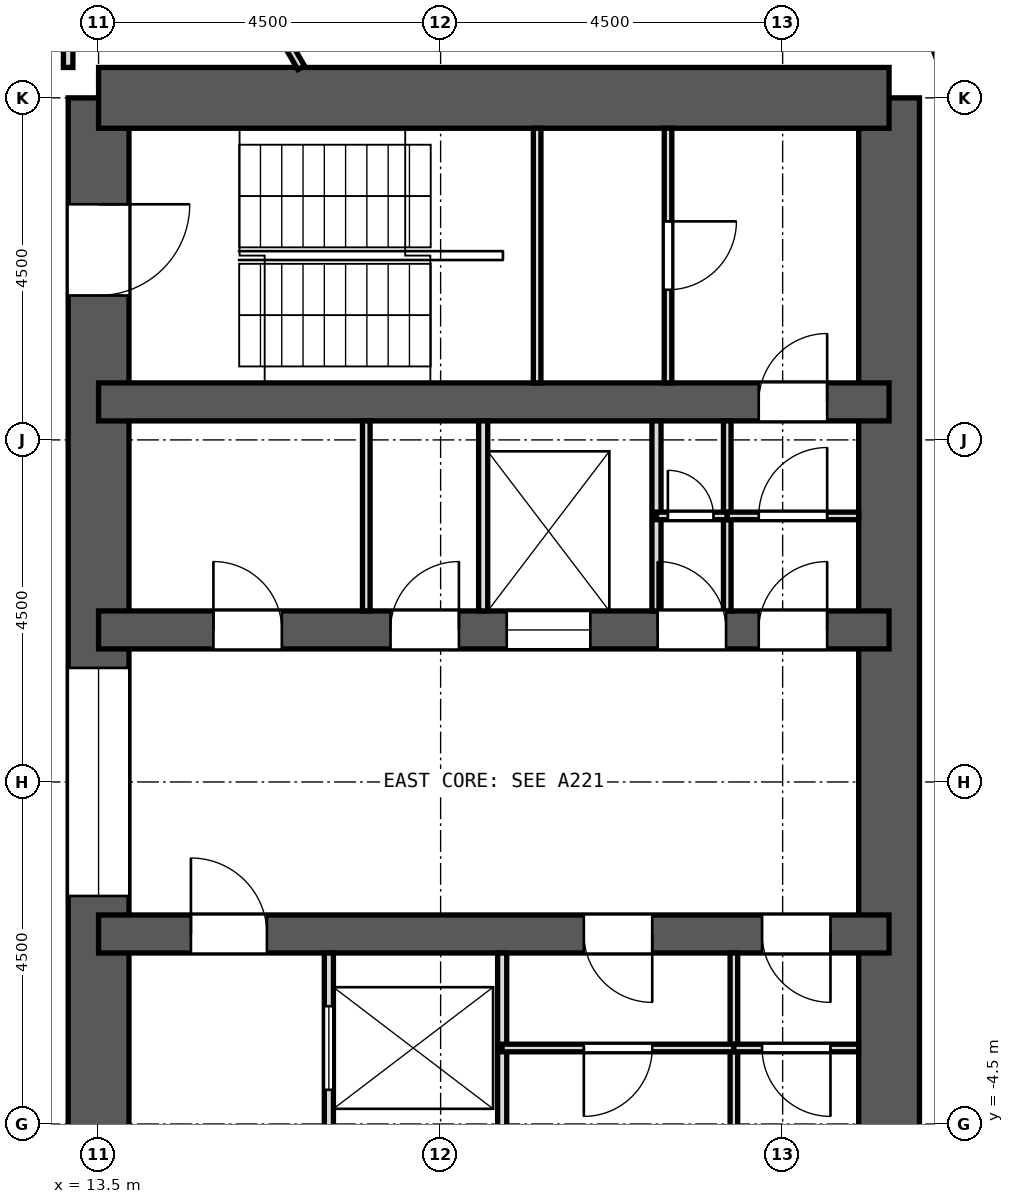
"""IFC4 building model, lengths in metres.
Left out: names, types, materials, properties, quantities, classifications, styles, units other than length and angle.
Written with IfcOpenShell. Run it as: python <this file> out.ifc"""

import sys

from ifc_helpers import new_model, si_unit, direction, frame, frame_2d, origin, place, context, subcontext, project, spatial, rectangle, extrude, element, fill, save


model = new_model("IFC4")
c1 = context("Model", 3, precision=1e-05, world=origin(), true_north=direction((0.0, 1.0)))
c2 = subcontext(c1, "Body", "Model", "MODEL_VIEW")
j1 = project(units=[si_unit("LENGTHUNIT", "METRE"), si_unit("PLANEANGLEUNIT", "RADIAN")], contexts=[c1])
p1 = place(None, origin())
s1 = spatial("IfcSite", under=j1, at=p1, CompositionType="ELEMENT")
p2 = place(p1, origin())
s2 = spatial("IfcBuilding", under=s1, at=p2, CompositionType="ELEMENT")
p3 = place(p2, frame((0.0, 0.0, 131.5)))
s3 = spatial("IfcBuildingStorey", under=s2, at=p3, CompositionType="ELEMENT", Elevation=131.5)
p4 = place(p3, frame((13.5, -9.0, 0.0), z_axis=(0.0, 0.0, 1.0), x_axis=(0.0, 1.0, 0.0)))
e1 = element("IfcWall", 1, at=p4, inside=s3, PredefinedType="SHEAR", context=c2, shape_type="SweptSolid", body=[
    extrude(rectangle(XDim=18.0, YDim=0.8, at=frame_2d((9.0, 0.0))), origin(), (0.0, 0.0, 1.0), 3.3),
])
p5 = place(p4, frame((15.4, 0.0, 0.0)))
e2 = element("IfcOpeningElement", 2, at=p5, cuts=e1, PredefinedType="OPENING", context=c2, shape_type="SweptSolid", body=[
    extrude(rectangle(XDim=1.2, YDim=2.1, at=frame_2d((0.6, 1.05))), frame((0.0, 0.412, 0.0), z_axis=(0.0, -1.0, 0.0), x_axis=(1.0, 0.0, 0.0)), (0.0, 0.0, 1.0), 0.824),
])
p6 = place(p4, frame((1.4, 0.0, 0.0)))
e3 = element("IfcOpeningElement", 3, at=p6, cuts=e1, PredefinedType="OPENING", context=c2, shape_type="SweptSolid", body=[
    extrude(rectangle(XDim=1.2, YDim=2.1, at=frame_2d((0.6, 1.05))), frame((0.0, 0.412, 0.0), z_axis=(0.0, -1.0, 0.0), x_axis=(1.0, 0.0, 0.0)), (0.0, 0.0, 1.0), 0.824),
])
p7 = place(p4, frame((7.5, 0.0, 0.0)))
e4 = element("IfcOpeningElement", 4, at=p7, cuts=e1, PredefinedType="OPENING", context=c2, shape_type="SweptSolid", body=[
    extrude(rectangle(XDim=3.0, YDim=2.4, at=frame_2d((1.5, 1.2))), frame((0.0, 0.412, 0.0), z_axis=(0.0, -1.0, 0.0), x_axis=(1.0, 0.0, 0.0)), (0.0, 0.0, 1.0), 0.824),
])
p8 = place(p3, frame((23.9, -9.0, 0.0), z_axis=(0.0, 0.0, 1.0), x_axis=(0.0, 1.0, 0.0)))
e5 = element("IfcWall", 5, at=p8, inside=s3, PredefinedType="SHEAR", context=c2, shape_type="SweptSolid", body=[
    extrude(rectangle(XDim=18.0, YDim=0.8, at=frame_2d((9.0, 0.0))), origin(), (0.0, 0.0, 1.0), 3.3),
])
p9 = place(p3, frame((13.5, 9.0, 0.0), z_axis=(0.0, 0.0, 1.0), x_axis=(1.0, 0.0, 0.0)))
e6 = element("IfcWall", 6, at=p9, inside=s3, PredefinedType="SHEAR", context=c2, shape_type="SweptSolid", body=[
    extrude(rectangle(XDim=10.4, YDim=0.8, at=frame_2d((5.2, 0.0))), origin(), (0.0, 0.0, 1.0), 3.3),
])
p10 = place(p3, frame((13.5, 5.0, 0.0), z_axis=(0.0, 0.0, 1.0), x_axis=(1.0, 0.0, 0.0)))
e7 = element("IfcWall", 7, at=p10, inside=s3, PredefinedType="SHEAR", context=c2, shape_type="SweptSolid", body=[
    extrude(rectangle(XDim=10.4, YDim=0.5, at=frame_2d((5.2, 0.0))), origin(), (0.0, 0.0, 1.0), 3.3),
])
p11 = place(p10, frame((8.686, 0.0, 0.0)))
e8 = element("IfcOpeningElement", 8, at=p11, cuts=e7, PredefinedType="OPENING", context=c2, shape_type="SweptSolid", body=[
    extrude(rectangle(XDim=0.9, YDim=2.1, at=frame_2d((0.45, 1.05))), frame((0.0, 0.262, 0.0), z_axis=(0.0, -1.0, 0.0), x_axis=(1.0, 0.0, 0.0)), (0.0, 0.0, 1.0), 0.524),
])
p12 = place(p3, frame((13.5, 2.0, 0.0), z_axis=(0.0, 0.0, 1.0), x_axis=(1.0, 0.0, 0.0)))
e9 = element("IfcWall", 9, at=p12, inside=s3, PredefinedType="SHEAR", context=c2, shape_type="SweptSolid", body=[
    extrude(rectangle(XDim=10.4, YDim=0.5, at=frame_2d((5.2, 0.0))), origin(), (0.0, 0.0, 1.0), 3.3),
])
p13 = place(p12, frame((5.37, 0.0, 0.0)))
e10 = element("IfcOpeningElement", 10, at=p13, cuts=e9, PredefinedType="OPENING", context=c2, shape_type="SweptSolid", body=[
    extrude(rectangle(XDim=1.1, YDim=2.1, at=frame_2d((0.55, 1.05))), frame((0.0, 0.262, 0.0), z_axis=(0.0, -1.0, 0.0), x_axis=(1.0, 0.0, 0.0)), (0.0, 0.0, 1.0), 0.524),
])
p14 = place(p12, frame((1.511, 0.0, 0.0)))
e11 = element("IfcOpeningElement", 11, at=p14, cuts=e9, PredefinedType="OPENING", context=c2, shape_type="SweptSolid", body=[
    extrude(rectangle(XDim=0.9, YDim=2.1, at=frame_2d((0.45, 1.05))), frame((0.0, 0.262, 0.0), z_axis=(0.0, -1.0, 0.0), x_axis=(1.0, 0.0, 0.0)), (0.0, 0.0, 1.0), 0.524),
])
p15 = place(p12, frame((3.841, 0.0, 0.0)))
e12 = element("IfcOpeningElement", 12, at=p15, cuts=e9, PredefinedType="OPENING", context=c2, shape_type="SweptSolid", body=[
    extrude(rectangle(XDim=0.9, YDim=2.1, at=frame_2d((0.45, 1.05))), frame((0.0, 0.262, 0.0), z_axis=(0.0, -1.0, 0.0), x_axis=(1.0, 0.0, 0.0)), (0.0, 0.0, 1.0), 0.524),
])
p16 = place(p12, frame((7.355, 0.0, 0.0)))
e13 = element("IfcOpeningElement", 13, at=p16, cuts=e9, PredefinedType="OPENING", context=c2, shape_type="SweptSolid", body=[
    extrude(rectangle(XDim=0.9, YDim=2.1, at=frame_2d((0.45, 1.05))), frame((0.0, 0.262, 0.0), z_axis=(0.0, -1.0, 0.0), x_axis=(1.0, 0.0, 0.0)), (0.0, 0.0, 1.0), 0.524),
])
p17 = place(p12, frame((8.686, 0.0, 0.0)))
e14 = element("IfcOpeningElement", 14, at=p17, cuts=e9, PredefinedType="OPENING", context=c2, shape_type="SweptSolid", body=[
    extrude(rectangle(XDim=0.9, YDim=2.1, at=frame_2d((0.45, 1.05))), frame((0.0, 0.262, 0.0), z_axis=(0.0, -1.0, 0.0), x_axis=(1.0, 0.0, 0.0)), (0.0, 0.0, 1.0), 0.524),
])
p18 = place(p3, frame((13.5, -2.0, 0.0), z_axis=(0.0, 0.0, 1.0), x_axis=(1.0, 0.0, 0.0)))
e15 = element("IfcWall", 15, at=p18, inside=s3, PredefinedType="SHEAR", context=c2, shape_type="SweptSolid", body=[
    extrude(rectangle(XDim=10.4, YDim=0.5, at=frame_2d((5.2, 0.0))), origin(), (0.0, 0.0, 1.0), 3.3),
])
p19 = place(p18, frame((1.215, 0.0, 0.0)))
e16 = element("IfcOpeningElement", 16, at=p19, cuts=e15, PredefinedType="OPENING", context=c2, shape_type="SweptSolid", body=[
    extrude(rectangle(XDim=1.0, YDim=2.1, at=frame_2d((0.5, 1.05))), frame((0.0, 0.262, 0.0), z_axis=(0.0, -1.0, 0.0), x_axis=(1.0, 0.0, 0.0)), (0.0, 0.0, 1.0), 0.524),
])
p20 = place(p18, frame((6.384, 0.0, 0.0)))
e17 = element("IfcOpeningElement", 17, at=p20, cuts=e15, PredefinedType="OPENING", context=c2, shape_type="SweptSolid", body=[
    extrude(rectangle(XDim=0.9, YDim=2.1, at=frame_2d((0.45, 1.05))), frame((0.0, 0.262, 0.0), z_axis=(0.0, -1.0, 0.0), x_axis=(1.0, 0.0, 0.0)), (0.0, 0.0, 1.0), 0.524),
])
p21 = place(p18, frame((8.729, 0.0, 0.0)))
e18 = element("IfcOpeningElement", 18, at=p21, cuts=e15, PredefinedType="OPENING", context=c2, shape_type="SweptSolid", body=[
    extrude(rectangle(XDim=0.9, YDim=2.1, at=frame_2d((0.45, 1.05))), frame((0.0, 0.262, 0.0), z_axis=(0.0, -1.0, 0.0), x_axis=(1.0, 0.0, 0.0)), (0.0, 0.0, 1.0), 0.524),
])
p22 = place(p3, frame((25.617, 7.383, 0.0), z_axis=(0.0, 0.0, 1.0), x_axis=(-0.341990236633, 0.939703505393, 0.0)))
e19 = element("IfcWall", 19, at=p22, inside=s3, PredefinedType="SOLIDWALL", context=c2, shape_type="SweptSolid", body=[
    extrude(rectangle(XDim=3.648, YDim=0.6, at=frame_2d((1.824, 0.0))), origin(), (0.0, 0.0, 1.0), 2.8),
])
p23 = place(p3, frame((15.351, 10.81, 0.0), z_axis=(0.0, 0.0, 1.0), x_axis=(0.499618727529, -0.866245419672, 0.0)))
e20 = element("IfcWall", 20, at=p23, inside=s3, PredefinedType="PARTITIONING", context=c2, shape_type="SweptSolid", body=[
    extrude(rectangle(XDim=1.63, YDim=0.1, at=frame_2d((0.815, 0.0))), origin(), (0.0, 0.0, 1.0), 2.8),
])
p24 = place(p3, frame((7.852, 7.852, 0.0), z_axis=(0.0, 0.0, 1.0), x_axis=(0.707106781187, 0.707106781187, 0.0)))
e21 = element("IfcWall", 21, at=p24, inside=s3, PredefinedType="PARTITIONING", context=c2, shape_type="SweptSolid", body=[
    extrude(rectangle(XDim=7.615, YDim=0.125, at=frame_2d((3.807, 0.0))), origin(), (0.0, 0.0, 1.0), 2.8),
])
p25 = place(p3, frame((13.1, 9.4, 0.0), z_axis=(0.0, 0.0, 1.0), x_axis=(0.0, 1.0, 0.0)))
e22 = element("IfcWall", 22, at=p25, inside=s3, PredefinedType="PARTITIONING", context=c2, shape_type="SweptSolid", body=[
    extrude(rectangle(XDim=3.638, YDim=0.125, at=frame_2d((1.819, 0.0))), origin(), (0.0, 0.0, 1.0), 2.8),
])
p26 = place(p3, frame((17.022, 2.25, 0.0), z_axis=(0.0, 0.0, 1.0), x_axis=(0.0, 1.0, 0.0)))
e23 = element("IfcWall", 23, at=p26, inside=s3, PredefinedType="PARTITIONING", context=c2, shape_type="SweptSolid", body=[
    extrude(rectangle(XDim=2.5, YDim=0.1, at=frame_2d((1.25, 0.0))), origin(), (0.0, 0.0, 1.0), 2.8),
])
for number, where, z_axis, x_axis in (
    (24, (18.56, 2.25, 0.0), (0.0, 0.0, 1.0), (0.0, 1.0, 0.0)),
    (25, (20.84, 2.25, 0.0), (0.0, 0.0, 1.0), (0.0, 1.0, 0.0)),
):
    element("IfcWall", number, at=place(p3, frame(where, z_axis=z_axis, x_axis=x_axis)), inside=s3, PredefinedType="PARTITIONING", context=c2, shape_type="SweptSolid", body=[
        extrude(rectangle(XDim=2.5, YDim=0.12, at=frame_2d((1.25, 0.0))), origin(), (0.0, 0.0, 1.0), 2.8),
    ])
p27 = place(p3, frame((21.771, 2.25, 0.0), z_axis=(0.0, 0.0, 1.0), x_axis=(0.0, 1.0, 0.0)))
e26 = element("IfcWall", 26, at=p27, inside=s3, PredefinedType="PARTITIONING", context=c2, shape_type="SweptSolid", body=[
    extrude(rectangle(XDim=2.5, YDim=0.1, at=frame_2d((1.25, 0.0))), origin(), (0.0, 0.0, 1.0), 2.8),
])
p28 = place(p3, frame((16.53, -4.75, 0.0), z_axis=(0.0, 0.0, 1.0), x_axis=(0.0, 1.0, 0.0)))
e27 = element("IfcWall", 27, at=p28, inside=s3, PredefinedType="PARTITIONING", context=c2, shape_type="SweptSolid", body=[
    extrude(rectangle(XDim=2.5, YDim=0.12, at=frame_2d((1.25, 0.0))), origin(), (0.0, 0.0, 1.0), 2.8),
])
p29 = place(p28, frame((0.7, 0.0, 0.0)))
e28 = element("IfcOpeningElement", 28, at=p29, cuts=e27, PredefinedType="OPENING", context=c2, shape_type="SweptSolid", body=[
    extrude(rectangle(XDim=1.1, YDim=2.1, at=frame_2d((0.55, 1.05))), frame((0.0, 0.072, 0.0), z_axis=(0.0, -1.0, 0.0), x_axis=(1.0, 0.0, 0.0)), (0.0, 0.0, 1.0), 0.144),
])
p30 = place(p3, frame((18.81, -4.75, 0.0), z_axis=(0.0, 0.0, 1.0), x_axis=(0.0, 1.0, 0.0)))
e29 = element("IfcWall", 29, at=p30, inside=s3, PredefinedType="PARTITIONING", context=c2, shape_type="SweptSolid", body=[
    extrude(rectangle(XDim=2.5, YDim=0.12, at=frame_2d((1.25, 0.0))), origin(), (0.0, 0.0, 1.0), 2.8),
])
p31 = place(p3, frame((21.858, -4.75, 0.0), z_axis=(0.0, 0.0, 1.0), x_axis=(0.0, 1.0, 0.0)))
e30 = element("IfcWall", 30, at=p31, inside=s3, PredefinedType="PARTITIONING", context=c2, shape_type="SweptSolid", body=[
    extrude(rectangle(XDim=2.5, YDim=0.1, at=frame_2d((1.25, 0.0))), origin(), (0.0, 0.0, 1.0), 2.8),
])
p32 = place(p3, frame((20.84, 3.5, 0.0), z_axis=(0.0, 0.0, 1.0), x_axis=(1.0, 0.0, 0.0)))
e31 = element("IfcWall", 31, at=p32, inside=s3, PredefinedType="PARTITIONING", context=c2, shape_type="SweptSolid", body=[
    extrude(rectangle(XDim=0.931, YDim=0.1, at=frame_2d((0.465, 0.0))), origin(), (0.0, 0.0, 1.0), 2.8),
])
p33 = place(p32, frame((0.15, 0.0, 0.0)))
e32 = element("IfcOpeningElement", 32, at=p33, cuts=e31, PredefinedType="OPENING", context=c2, shape_type="SweptSolid", body=[
    extrude(rectangle(XDim=0.6, YDim=2.1, at=frame_2d((0.3, 1.05))), frame((0.0, 0.062, 0.0), z_axis=(0.0, -1.0, 0.0), x_axis=(1.0, 0.0, 0.0)), (0.0, 0.0, 1.0), 0.124),
])
p34 = place(p3, frame((21.771, 3.5, 0.0), z_axis=(0.0, 0.0, 1.0), x_axis=(1.0, 0.0, 0.0)))
e33 = element("IfcWall", 33, at=p34, inside=s3, PredefinedType="PARTITIONING", context=c2, shape_type="SweptSolid", body=[
    extrude(rectangle(XDim=1.729, YDim=0.1, at=frame_2d((0.865, 0.0))), origin(), (0.0, 0.0, 1.0), 2.8),
])
p35 = place(p34, frame((0.415, 0.0, 0.0)))
e34 = element("IfcOpeningElement", 34, at=p35, cuts=e33, PredefinedType="OPENING", context=c2, shape_type="SweptSolid", body=[
    extrude(rectangle(XDim=0.9, YDim=2.1, at=frame_2d((0.45, 1.05))), frame((0.0, 0.062, 0.0), z_axis=(0.0, -1.0, 0.0), x_axis=(1.0, 0.0, 0.0)), (0.0, 0.0, 1.0), 0.124),
])
p36 = place(p3, frame((18.81, -3.5, 0.0), z_axis=(0.0, 0.0, 1.0), x_axis=(1.0, 0.0, 0.0)))
e35 = element("IfcWall", 35, at=p36, inside=s3, PredefinedType="PARTITIONING", context=c2, shape_type="SweptSolid", body=[
    extrude(rectangle(XDim=3.048, YDim=0.1, at=frame_2d((1.524, 0.0))), origin(), (0.0, 0.0, 1.0), 2.8),
])
p37 = place(p36, frame((1.074, 0.0, 0.0)))
e36 = element("IfcOpeningElement", 36, at=p37, cuts=e35, PredefinedType="OPENING", context=c2, shape_type="SweptSolid", body=[
    extrude(rectangle(XDim=0.9, YDim=2.1, at=frame_2d((0.45, 1.05))), frame((0.0, 0.062, 0.0), z_axis=(0.0, -1.0, 0.0), x_axis=(1.0, 0.0, 0.0)), (0.0, 0.0, 1.0), 0.124),
])
p38 = place(p3, frame((21.858, -3.5, 0.0), z_axis=(0.0, 0.0, 1.0), x_axis=(1.0, 0.0, 0.0)))
e37 = element("IfcWall", 37, at=p38, inside=s3, PredefinedType="PARTITIONING", context=c2, shape_type="SweptSolid", body=[
    extrude(rectangle(XDim=1.642, YDim=0.1, at=frame_2d((0.821, 0.0))), origin(), (0.0, 0.0, 1.0), 2.8),
])
p39 = place(p38, frame((0.371, 0.0, 0.0)))
e38 = element("IfcOpeningElement", 38, at=p39, cuts=e37, PredefinedType="OPENING", context=c2, shape_type="SweptSolid", body=[
    extrude(rectangle(XDim=0.9, YDim=2.1, at=frame_2d((0.45, 1.05))), frame((0.0, 0.062, 0.0), z_axis=(0.0, -1.0, 0.0), x_axis=(1.0, 0.0, 0.0)), (0.0, 0.0, 1.0), 0.124),
])
p40 = place(p3, frame((19.27, 5.25, 0.0), z_axis=(0.0, 0.0, 1.0), x_axis=(0.0, 1.0, 0.0)))
e39 = element("IfcWall", 39, at=p40, inside=s3, PredefinedType="PARTITIONING", context=c2, shape_type="SweptSolid", body=[
    extrude(rectangle(XDim=3.35, YDim=0.1, at=frame_2d((1.675, 0.0))), origin(), (0.0, 0.0, 1.0), 2.8),
])
p41 = place(p3, frame((20.992, 5.25, 0.0), z_axis=(0.0, 0.0, 1.0), x_axis=(0.0, 1.0, 0.0)))
e40 = element("IfcWall", 40, at=p41, inside=s3, PredefinedType="PARTITIONING", context=c2, shape_type="SweptSolid", body=[
    extrude(rectangle(XDim=3.35, YDim=0.1, at=frame_2d((1.675, 0.0))), origin(), (0.0, 0.0, 1.0), 2.8),
])
p42 = place(p41, frame((1.225, 0.0, 0.0)))
e41 = element("IfcOpeningElement", 41, at=p42, cuts=e40, PredefinedType="OPENING", context=c2, shape_type="SweptSolid", body=[
    extrude(rectangle(XDim=0.9, YDim=2.1, at=frame_2d((0.45, 1.05))), frame((0.0, 0.062, 0.0), z_axis=(0.0, -1.0, 0.0), x_axis=(1.0, 0.0, 0.0)), (0.0, 0.0, 1.0), 0.124),
])
p43 = place(p13, origin())
e42 = element("IfcDoor", 42, at=p43, inside=s3, OperationType="DOUBLE_DOOR_SLIDING", PredefinedType="DOOR", context=c2, shape_type="SweptSolid", body=[
    extrude(rectangle(XDim=1.1, YDim=2.1, at=frame_2d((0.55, 1.05))), frame((0.0, 0.025, 0.0), z_axis=(0.0, -1.0, 0.0), x_axis=(1.0, 0.0, 0.0)), (0.0, 0.0, 1.0), 0.05),
])
fill(e10, e42)
p44 = place(p29, origin())
e43 = element("IfcDoor", 43, at=p44, inside=s3, OperationType="DOUBLE_DOOR_SLIDING", PredefinedType="DOOR", context=c2, shape_type="SweptSolid", body=[
    extrude(rectangle(XDim=1.1, YDim=2.1, at=frame_2d((0.55, 1.05))), frame((0.0, 0.025, 0.0), z_axis=(0.0, -1.0, 0.0), x_axis=(1.0, 0.0, 0.0)), (0.0, 0.0, 1.0), 0.05),
])
fill(e28, e43)
p45 = place(p14, origin())
e44 = element("IfcDoor", 44, at=p45, inside=s3, OperationType="SINGLE_SWING_LEFT", PredefinedType="DOOR", context=c2, shape_type="SweptSolid", body=[
    extrude(rectangle(XDim=0.9, YDim=2.1, at=frame_2d((0.45, 1.05))), frame((0.0, 0.025, 0.0), z_axis=(0.0, -1.0, 0.0), x_axis=(1.0, 0.0, 0.0)), (0.0, 0.0, 1.0), 0.05),
])
fill(e11, e44)
p46 = place(p15, origin())
e45 = element("IfcDoor", 45, at=p46, inside=s3, OperationType="SINGLE_SWING_RIGHT", PredefinedType="DOOR", context=c2, shape_type="SweptSolid", body=[
    extrude(rectangle(XDim=0.9, YDim=2.1, at=frame_2d((0.45, 1.05))), frame((0.0, 0.025, 0.0), z_axis=(0.0, -1.0, 0.0), x_axis=(1.0, 0.0, 0.0)), (0.0, 0.0, 1.0), 0.05),
])
fill(e12, e45)
p47 = place(p16, origin())
e46 = element("IfcDoor", 46, at=p47, inside=s3, OperationType="SINGLE_SWING_LEFT", PredefinedType="DOOR", context=c2, shape_type="SweptSolid", body=[
    extrude(rectangle(XDim=0.9, YDim=2.1, at=frame_2d((0.45, 1.05))), frame((0.0, 0.025, 0.0), z_axis=(0.0, -1.0, 0.0), x_axis=(1.0, 0.0, 0.0)), (0.0, 0.0, 1.0), 0.05),
])
fill(e13, e46)
p48 = place(p17, origin())
e47 = element("IfcDoor", 47, at=p48, inside=s3, OperationType="SINGLE_SWING_RIGHT", PredefinedType="DOOR", context=c2, shape_type="SweptSolid", body=[
    extrude(rectangle(XDim=0.9, YDim=2.1, at=frame_2d((0.45, 1.05))), frame((0.0, 0.025, 0.0), z_axis=(0.0, -1.0, 0.0), x_axis=(1.0, 0.0, 0.0)), (0.0, 0.0, 1.0), 0.05),
])
fill(e14, e47)
p49 = place(p19, origin())
e48 = element("IfcDoor", 48, at=p49, inside=s3, OperationType="SINGLE_SWING_LEFT", PredefinedType="DOOR", context=c2, shape_type="SweptSolid", body=[
    extrude(rectangle(XDim=1.0, YDim=2.1, at=frame_2d((0.5, 1.05))), frame((0.0, 0.025, 0.0), z_axis=(0.0, -1.0, 0.0), x_axis=(1.0, 0.0, 0.0)), (0.0, 0.0, 1.0), 0.05),
])
fill(e16, e48)
p50 = place(p20, frame((0.9, 0.0, 0.0), z_axis=(0.0, 0.0, 1.0), x_axis=(-1.0, 0.0, 0.0)))
e49 = element("IfcDoor", 49, at=p50, inside=s3, OperationType="SINGLE_SWING_LEFT", PredefinedType="DOOR", context=c2, shape_type="SweptSolid", body=[
    extrude(rectangle(XDim=0.9, YDim=2.1, at=frame_2d((0.45, 1.05))), frame((0.0, 0.025, 0.0), z_axis=(0.0, -1.0, 0.0), x_axis=(1.0, 0.0, 0.0)), (0.0, 0.0, 1.0), 0.05),
])
fill(e17, e49)
p51 = place(p21, frame((0.9, 0.0, 0.0), z_axis=(0.0, 0.0, 1.0), x_axis=(-1.0, 0.0, 0.0)))
e50 = element("IfcDoor", 50, at=p51, inside=s3, OperationType="SINGLE_SWING_LEFT", PredefinedType="DOOR", context=c2, shape_type="SweptSolid", body=[
    extrude(rectangle(XDim=0.9, YDim=2.1, at=frame_2d((0.45, 1.05))), frame((0.0, 0.025, 0.0), z_axis=(0.0, -1.0, 0.0), x_axis=(1.0, 0.0, 0.0)), (0.0, 0.0, 1.0), 0.05),
])
fill(e18, e50)
p52 = place(p33, origin())
e51 = element("IfcDoor", 51, at=p52, inside=s3, OperationType="SINGLE_SWING_LEFT", PredefinedType="DOOR", context=c2, shape_type="SweptSolid", body=[
    extrude(rectangle(XDim=0.6, YDim=2.1, at=frame_2d((0.3, 1.05))), frame((0.0, 0.025, 0.0), z_axis=(0.0, -1.0, 0.0), x_axis=(1.0, 0.0, 0.0)), (0.0, 0.0, 1.0), 0.05),
])
fill(e32, e51)
p53 = place(p35, origin())
e52 = element("IfcDoor", 52, at=p53, inside=s3, OperationType="SINGLE_SWING_RIGHT", PredefinedType="DOOR", context=c2, shape_type="SweptSolid", body=[
    extrude(rectangle(XDim=0.9, YDim=2.1, at=frame_2d((0.45, 1.05))), frame((0.0, 0.025, 0.0), z_axis=(0.0, -1.0, 0.0), x_axis=(1.0, 0.0, 0.0)), (0.0, 0.0, 1.0), 0.05),
])
fill(e34, e52)
p54 = place(p42, frame((0.9, 0.0, 0.0), z_axis=(0.0, 0.0, 1.0), x_axis=(-1.0, 0.0, 0.0)))
e53 = element("IfcDoor", 53, at=p54, inside=s3, OperationType="SINGLE_SWING_LEFT", PredefinedType="DOOR", context=c2, shape_type="SweptSolid", body=[
    extrude(rectangle(XDim=0.9, YDim=2.1, at=frame_2d((0.45, 1.05))), frame((0.0, 0.025, 0.0), z_axis=(0.0, -1.0, 0.0), x_axis=(1.0, 0.0, 0.0)), (0.0, 0.0, 1.0), 0.05),
])
fill(e41, e53)
p55 = place(p11, origin())
e54 = element("IfcDoor", 54, at=p55, inside=s3, OperationType="SINGLE_SWING_RIGHT", PredefinedType="DOOR", context=c2, shape_type="SweptSolid", body=[
    extrude(rectangle(XDim=0.9, YDim=2.1, at=frame_2d((0.45, 1.05))), frame((0.0, 0.025, 0.0), z_axis=(0.0, -1.0, 0.0), x_axis=(1.0, 0.0, 0.0)), (0.0, 0.0, 1.0), 0.05),
])
fill(e8, e54)
p56 = place(p39, frame((0.9, 0.0, 0.0), z_axis=(0.0, 0.0, 1.0), x_axis=(-1.0, 0.0, 0.0)))
e55 = element("IfcDoor", 55, at=p56, inside=s3, OperationType="SINGLE_SWING_LEFT", PredefinedType="DOOR", context=c2, shape_type="SweptSolid", body=[
    extrude(rectangle(XDim=0.9, YDim=2.1, at=frame_2d((0.45, 1.05))), frame((0.0, 0.025, 0.0), z_axis=(0.0, -1.0, 0.0), x_axis=(1.0, 0.0, 0.0)), (0.0, 0.0, 1.0), 0.05),
])
fill(e38, e55)
p57 = place(p37, frame((0.9, 0.0, 0.0), z_axis=(0.0, 0.0, 1.0), x_axis=(-1.0, 0.0, 0.0)))
e56 = element("IfcDoor", 56, at=p57, inside=s3, OperationType="SINGLE_SWING_RIGHT", PredefinedType="DOOR", context=c2, shape_type="SweptSolid", body=[
    extrude(rectangle(XDim=0.9, YDim=2.1, at=frame_2d((0.45, 1.05))), frame((0.0, 0.025, 0.0), z_axis=(0.0, -1.0, 0.0), x_axis=(1.0, 0.0, 0.0)), (0.0, 0.0, 1.0), 0.05),
])
fill(e36, e56)
p58 = place(p5, frame((1.2, 0.0, 0.0), z_axis=(0.0, 0.0, 1.0), x_axis=(-1.0, 0.0, 0.0)))
e57 = element("IfcDoor", 57, at=p58, inside=s3, OperationType="SINGLE_SWING_LEFT", PredefinedType="DOOR", context=c2, shape_type="SweptSolid", body=[
    extrude(rectangle(XDim=1.2, YDim=2.1, at=frame_2d((0.6, 1.05))), frame((0.0, 0.025, 0.0), z_axis=(0.0, -1.0, 0.0), x_axis=(1.0, 0.0, 0.0)), (0.0, 0.0, 1.0), 0.05),
])
fill(e2, e57)
p59 = place(p7, origin())
e58 = element("IfcDoor", 58, at=p59, inside=s3, OperationType="DOUBLE_DOOR_SLIDING", PredefinedType="DOOR", context=c2, shape_type="SweptSolid", body=[
    extrude(rectangle(XDim=3.0, YDim=2.4, at=frame_2d((1.5, 1.2))), frame((0.0, 0.025, 0.0), z_axis=(0.0, -1.0, 0.0), x_axis=(1.0, 0.0, 0.0)), (0.0, 0.0, 1.0), 0.05),
])
fill(e4, e58)
save(model, sys.argv[1])
